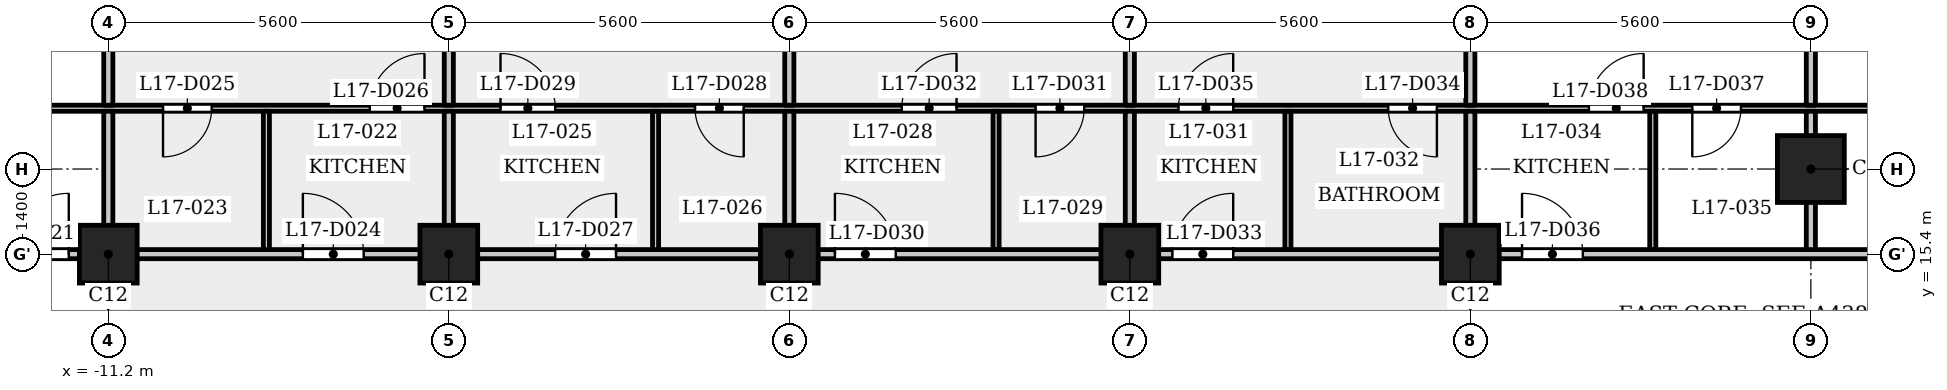
"""IFC4 building model, lengths in metres.
Left out: names, types, materials, properties, quantities, classifications, styles, units other than length and angle.
Written with IfcOpenShell. Run it as: python <this file> out.ifc"""

import sys

from ifc_helpers import new_model, si_unit, direction, frame, frame_2d, origin, origin_2d, place, context, subcontext, project, spatial, rectangle, extrude, element, fill, save


model = new_model("IFC4")
c1 = context("Model", 3, precision=1e-05, world=origin(), true_north=direction((0.0, 1.0)))
c2 = subcontext(c1, "Body", "Model", "MODEL_VIEW")
j1 = project(units=[si_unit("LENGTHUNIT", "METRE"), si_unit("PLANEANGLEUNIT", "RADIAN")], contexts=[c1])
p1 = place(None, origin())
s1 = spatial("IfcSite", under=j1, at=p1, CompositionType="ELEMENT")
p2 = place(p1, origin())
s2 = spatial("IfcBuilding", under=s1, at=p2, CompositionType="ELEMENT")
p3 = place(p2, frame((0.0, 0.0, 69.0)))
s3 = spatial("IfcBuildingStorey", under=s2, at=p3, CompositionType="ELEMENT", Elevation=69.0)
p4 = place(p3, frame((16.8, 16.8, 0.0), z_axis=(0.0, 0.0, 1.0), x_axis=(1.0, 0.0, 0.0)))
e1 = element("IfcColumn", 1, at=p4, inside=s3, PredefinedType="COLUMN", context=c2, shape_type="SweptSolid", body=[
    extrude(rectangle(XDim=1.1, YDim=1.1, at=origin_2d()), origin(), (0.0, 0.0, 1.0), 3.5),
])
for number, where, z_axis, x_axis in (
    (2, (-11.2, 15.4, 0.0), (0.0, 0.0, 1.0), (1.0, 0.0, 0.0)),
    (3, (-5.6, 15.4, 0.0), (0.0, 0.0, 1.0), (1.0, 0.0, 0.0)),
    (4, (0.0, 15.4, 0.0), (0.0, 0.0, 1.0), (1.0, 0.0, 0.0)),
    (5, (5.6, 15.4, 0.0), (0.0, 0.0, 1.0), (1.0, 0.0, 0.0)),
    (6, (11.2, 15.4, 0.0), (0.0, 0.0, 1.0), (1.0, 0.0, 0.0)),
):
    element("IfcColumn", number, at=place(p3, frame(where, z_axis=z_axis, x_axis=x_axis)), inside=s3, PredefinedType="COLUMN", context=c2, shape_type="SweptSolid", body=[
        extrude(rectangle(XDim=0.95, YDim=0.95, at=origin_2d()), origin(), (0.0, 0.0, 1.0), 3.5),
    ])
p5 = place(p3, frame((-27.484, 15.4, 0.0), z_axis=(0.0, 0.0, 1.0), x_axis=(1.0, 0.0, 0.0)))
e7 = element("IfcWall", 7, at=p5, inside=s3, PredefinedType="PARTITIONING", context=c2, shape_type="SweptSolid", body=[
    extrude(rectangle(XDim=54.968, YDim=0.15, at=frame_2d((27.484, 0.0))), origin(), (0.0, 0.0, 1.0), 3.15),
])
p6 = place(p5, frame((8.784, 0.0, 0.0)))
e8 = element("IfcOpeningElement", 8, at=p6, cuts=e7, PredefinedType="OPENING", context=c2, shape_type="SweptSolid", body=[
    extrude(rectangle(XDim=1.0, YDim=2.1, at=frame_2d((0.5, 1.05))), frame((0.0, 0.085, 0.0), z_axis=(0.0, -1.0, 0.0), x_axis=(1.0, 0.0, 0.0)), (0.0, 0.0, 1.0), 0.17),
])
p7 = place(p5, frame((14.634, 0.0, 0.0)))
e9 = element("IfcOpeningElement", 9, at=p7, cuts=e7, PredefinedType="OPENING", context=c2, shape_type="SweptSolid", body=[
    extrude(rectangle(XDim=1.0, YDim=2.1, at=frame_2d((0.5, 1.05))), frame((0.0, 0.085, 0.0), z_axis=(0.0, -1.0, 0.0), x_axis=(1.0, 0.0, 0.0)), (0.0, 0.0, 1.0), 0.17),
])
p8 = place(p5, frame((19.484, 0.0, 0.0)))
e10 = element("IfcOpeningElement", 10, at=p8, cuts=e7, PredefinedType="OPENING", context=c2, shape_type="SweptSolid", body=[
    extrude(rectangle(XDim=1.0, YDim=2.1, at=frame_2d((0.5, 1.05))), frame((0.0, 0.085, 0.0), z_axis=(0.0, -1.0, 0.0), x_axis=(1.0, 0.0, 0.0)), (0.0, 0.0, 1.0), 0.17),
])
p9 = place(p5, frame((23.634, 0.0, 0.0)))
e11 = element("IfcOpeningElement", 11, at=p9, cuts=e7, PredefinedType="OPENING", context=c2, shape_type="SweptSolid", body=[
    extrude(rectangle(XDim=1.0, YDim=2.1, at=frame_2d((0.5, 1.05))), frame((0.0, 0.085, 0.0), z_axis=(0.0, -1.0, 0.0), x_axis=(1.0, 0.0, 0.0)), (0.0, 0.0, 1.0), 0.17),
])
p10 = place(p5, frame((28.234, 0.0, 0.0)))
e12 = element("IfcOpeningElement", 12, at=p10, cuts=e7, PredefinedType="OPENING", context=c2, shape_type="SweptSolid", body=[
    extrude(rectangle(XDim=1.0, YDim=2.1, at=frame_2d((0.5, 1.05))), frame((0.0, 0.085, 0.0), z_axis=(0.0, -1.0, 0.0), x_axis=(1.0, 0.0, 0.0)), (0.0, 0.0, 1.0), 0.17),
])
p11 = place(p5, frame((33.784, 0.0, 0.0)))
e13 = element("IfcOpeningElement", 13, at=p11, cuts=e7, PredefinedType="OPENING", context=c2, shape_type="SweptSolid", body=[
    extrude(rectangle(XDim=1.0, YDim=2.1, at=frame_2d((0.5, 1.05))), frame((0.0, 0.085, 0.0), z_axis=(0.0, -1.0, 0.0), x_axis=(1.0, 0.0, 0.0)), (0.0, 0.0, 1.0), 0.17),
])
p12 = place(p5, frame((39.534, 0.0, 0.0)))
e14 = element("IfcOpeningElement", 14, at=p12, cuts=e7, PredefinedType="OPENING", context=c2, shape_type="SweptSolid", body=[
    extrude(rectangle(XDim=1.0, YDim=2.1, at=frame_2d((0.5, 1.05))), frame((0.0, 0.085, 0.0), z_axis=(0.0, -1.0, 0.0), x_axis=(1.0, 0.0, 0.0)), (0.0, 0.0, 1.0), 0.17),
])
p13 = place(p5, frame((48.234, 0.0, 0.0)))
e15 = element("IfcOpeningElement", 15, at=p13, cuts=e7, PredefinedType="OPENING", context=c2, shape_type="SweptSolid", body=[
    extrude(rectangle(XDim=1.0, YDim=2.1, at=frame_2d((0.5, 1.05))), frame((0.0, 0.085, 0.0), z_axis=(0.0, -1.0, 0.0), x_axis=(1.0, 0.0, 0.0)), (0.0, 0.0, 1.0), 0.17),
])
p14 = place(p3, frame((-26.64, 17.8, 0.0), z_axis=(0.0, 0.0, 1.0), x_axis=(1.0, 0.0, 0.0)))
e16 = element("IfcWall", 16, at=p14, inside=s3, PredefinedType="PARTITIONING", context=c2, shape_type="SweptSolid", body=[
    extrude(rectangle(XDim=53.034, YDim=0.1, at=frame_2d((26.517, 0.0))), origin(), (0.0, 0.0, 1.0), 3.15),
])
p15 = place(p14, frame((2.872, 0.0, 0.0)))
e17 = element("IfcOpeningElement", 17, at=p15, cuts=e16, PredefinedType="OPENING", context=c2, shape_type="SweptSolid", body=[
    extrude(rectangle(XDim=0.8, YDim=2.1, at=frame_2d((0.4, 1.05))), frame((0.0, 0.06, 0.0), z_axis=(0.0, -1.0, 0.0), x_axis=(1.0, 0.0, 0.0)), (0.0, 0.0, 1.0), 0.12),
])
p16 = place(p14, frame((7.04, 0.0, 0.0)))
e18 = element("IfcOpeningElement", 18, at=p16, cuts=e16, PredefinedType="OPENING", context=c2, shape_type="SweptSolid", body=[
    extrude(rectangle(XDim=0.9, YDim=2.1, at=frame_2d((0.45, 1.05))), frame((0.0, 0.06, 0.0), z_axis=(0.0, -1.0, 0.0), x_axis=(1.0, 0.0, 0.0)), (0.0, 0.0, 1.0), 0.12),
])
p17 = place(p14, frame((10.74, 0.0, 0.0)))
e19 = element("IfcOpeningElement", 19, at=p17, cuts=e16, PredefinedType="OPENING", context=c2, shape_type="SweptSolid", body=[
    extrude(rectangle(XDim=0.8, YDim=2.1, at=frame_2d((0.4, 1.05))), frame((0.0, 0.06, 0.0), z_axis=(0.0, -1.0, 0.0), x_axis=(1.0, 0.0, 0.0)), (0.0, 0.0, 1.0), 0.12),
])
p18 = place(p14, frame((12.89, 0.0, 0.0)))
e20 = element("IfcOpeningElement", 20, at=p18, cuts=e16, PredefinedType="OPENING", context=c2, shape_type="SweptSolid", body=[
    extrude(rectangle(XDim=0.9, YDim=2.1, at=frame_2d((0.45, 1.05))), frame((0.0, 0.06, 0.0), z_axis=(0.0, -1.0, 0.0), x_axis=(1.0, 0.0, 0.0)), (0.0, 0.0, 1.0), 0.12),
])
p19 = place(p14, frame((16.34, 0.0, 0.0)))
e21 = element("IfcOpeningElement", 21, at=p19, cuts=e16, PredefinedType="OPENING", context=c2, shape_type="SweptSolid", body=[
    extrude(rectangle(XDim=0.8, YDim=2.1, at=frame_2d((0.4, 1.05))), frame((0.0, 0.06, 0.0), z_axis=(0.0, -1.0, 0.0), x_axis=(1.0, 0.0, 0.0)), (0.0, 0.0, 1.0), 0.12),
])
p20 = place(p14, frame((19.74, 0.0, 0.0)))
e22 = element("IfcOpeningElement", 22, at=p20, cuts=e16, PredefinedType="OPENING", context=c2, shape_type="SweptSolid", body=[
    extrude(rectangle(XDim=0.9, YDim=2.1, at=frame_2d((0.45, 1.05))), frame((0.0, 0.06, 0.0), z_axis=(0.0, -1.0, 0.0), x_axis=(1.0, 0.0, 0.0)), (0.0, 0.0, 1.0), 0.12),
])
p21 = place(p14, frame((25.09, 0.0, 0.0)))
e23 = element("IfcOpeningElement", 23, at=p21, cuts=e16, PredefinedType="OPENING", context=c2, shape_type="SweptSolid", body=[
    extrude(rectangle(XDim=0.8, YDim=2.1, at=frame_2d((0.4, 1.05))), frame((0.0, 0.06, 0.0), z_axis=(0.0, -1.0, 0.0), x_axis=(1.0, 0.0, 0.0)), (0.0, 0.0, 1.0), 0.12),
])
p22 = place(p14, frame((21.89, 0.0, 0.0)))
e24 = element("IfcOpeningElement", 24, at=p22, cuts=e16, PredefinedType="OPENING", context=c2, shape_type="SweptSolid", body=[
    extrude(rectangle(XDim=0.9, YDim=2.1, at=frame_2d((0.45, 1.05))), frame((0.0, 0.06, 0.0), z_axis=(0.0, -1.0, 0.0), x_axis=(1.0, 0.0, 0.0)), (0.0, 0.0, 1.0), 0.12),
])
p23 = place(p14, frame((30.69, 0.0, 0.0)))
e25 = element("IfcOpeningElement", 25, at=p23, cuts=e16, PredefinedType="OPENING", context=c2, shape_type="SweptSolid", body=[
    extrude(rectangle(XDim=0.8, YDim=2.1, at=frame_2d((0.4, 1.05))), frame((0.0, 0.06, 0.0), z_axis=(0.0, -1.0, 0.0), x_axis=(1.0, 0.0, 0.0)), (0.0, 0.0, 1.0), 0.12),
])
p24 = place(p14, frame((28.49, 0.0, 0.0)))
e26 = element("IfcOpeningElement", 26, at=p24, cuts=e16, PredefinedType="OPENING", context=c2, shape_type="SweptSolid", body=[
    extrude(rectangle(XDim=0.9, YDim=2.1, at=frame_2d((0.45, 1.05))), frame((0.0, 0.06, 0.0), z_axis=(0.0, -1.0, 0.0), x_axis=(1.0, 0.0, 0.0)), (0.0, 0.0, 1.0), 0.12),
])
p25 = place(p14, frame((36.49, 0.0, 0.0)))
e27 = element("IfcOpeningElement", 27, at=p25, cuts=e16, PredefinedType="OPENING", context=c2, shape_type="SweptSolid", body=[
    extrude(rectangle(XDim=0.8, YDim=2.1, at=frame_2d((0.4, 1.05))), frame((0.0, 0.06, 0.0), z_axis=(0.0, -1.0, 0.0), x_axis=(1.0, 0.0, 0.0)), (0.0, 0.0, 1.0), 0.12),
])
p26 = place(p14, frame((33.04, 0.0, 0.0)))
e28 = element("IfcOpeningElement", 28, at=p26, cuts=e16, PredefinedType="OPENING", context=c2, shape_type="SweptSolid", body=[
    extrude(rectangle(XDim=0.9, YDim=2.1, at=frame_2d((0.45, 1.05))), frame((0.0, 0.06, 0.0), z_axis=(0.0, -1.0, 0.0), x_axis=(1.0, 0.0, 0.0)), (0.0, 0.0, 1.0), 0.12),
])
p27 = place(p14, frame((41.49, 0.0, 0.0)))
e29 = element("IfcOpeningElement", 29, at=p27, cuts=e16, PredefinedType="OPENING", context=c2, shape_type="SweptSolid", body=[
    extrude(rectangle(XDim=0.8, YDim=2.1, at=frame_2d((0.4, 1.05))), frame((0.0, 0.06, 0.0), z_axis=(0.0, -1.0, 0.0), x_axis=(1.0, 0.0, 0.0)), (0.0, 0.0, 1.0), 0.12),
])
p28 = place(p14, frame((39.79, 0.0, 0.0)))
e30 = element("IfcOpeningElement", 30, at=p28, cuts=e16, PredefinedType="OPENING", context=c2, shape_type="SweptSolid", body=[
    extrude(rectangle(XDim=0.9, YDim=2.1, at=frame_2d((0.45, 1.05))), frame((0.0, 0.06, 0.0), z_axis=(0.0, -1.0, 0.0), x_axis=(1.0, 0.0, 0.0)), (0.0, 0.0, 1.0), 0.12),
])
p29 = place(p14, frame((51.44, 0.0, 0.0)))
e31 = element("IfcOpeningElement", 31, at=p29, cuts=e16, PredefinedType="OPENING", context=c2, shape_type="SweptSolid", body=[
    extrude(rectangle(XDim=0.8, YDim=2.1, at=frame_2d((0.4, 1.05))), frame((0.0, 0.06, 0.0), z_axis=(0.0, -1.0, 0.0), x_axis=(1.0, 0.0, 0.0)), (0.0, 0.0, 1.0), 0.12),
])
p30 = place(p14, frame((46.49, 0.0, 0.0)))
e32 = element("IfcOpeningElement", 32, at=p30, cuts=e16, PredefinedType="OPENING", context=c2, shape_type="SweptSolid", body=[
    extrude(rectangle(XDim=0.9, YDim=2.1, at=frame_2d((0.45, 1.05))), frame((0.0, 0.06, 0.0), z_axis=(0.0, -1.0, 0.0), x_axis=(1.0, 0.0, 0.0)), (0.0, 0.0, 1.0), 0.12),
])
p31 = place(p3, frame((-11.2, 15.475, 0.0), z_axis=(0.0, 0.0, 1.0), x_axis=(0.0, 1.0, 0.0)))
e33 = element("IfcWall", 33, at=p31, inside=s3, PredefinedType="PARTITIONING", context=c2, shape_type="SweptSolid", body=[
    extrude(rectangle(XDim=2.275, YDim=0.15, at=frame_2d((1.137, 0.0))), origin(), (0.0, 0.0, 1.0), 3.15),
])
p32 = place(p3, frame((-11.2, 17.85, 0.0), z_axis=(0.0, 0.0, 1.0), x_axis=(0.0, 1.0, 0.0)))
e34 = element("IfcWall", 34, at=p32, inside=s3, PredefinedType="PARTITIONING", context=c2, shape_type="SweptSolid", body=[
    extrude(rectangle(XDim=5.23, YDim=0.15, at=frame_2d((2.615, 0.0))), origin(), (0.0, 0.0, 1.0), 3.15),
])
p33 = place(p3, frame((-8.6, 15.475, 0.0), z_axis=(0.0, 0.0, 1.0), x_axis=(0.0, 1.0, 0.0)))
e35 = element("IfcWall", 35, at=p33, inside=s3, PredefinedType="PARTITIONING", context=c2, shape_type="SweptSolid", body=[
    extrude(rectangle(XDim=2.275, YDim=0.1, at=frame_2d((1.137, 0.0))), origin(), (0.0, 0.0, 1.0), 3.15),
])
p34 = place(p3, frame((-5.6, 15.475, 0.0), z_axis=(0.0, 0.0, 1.0), x_axis=(0.0, 1.0, 0.0)))
e36 = element("IfcWall", 36, at=p34, inside=s3, PredefinedType="PARTITIONING", context=c2, shape_type="SweptSolid", body=[
    extrude(rectangle(XDim=2.275, YDim=0.15, at=frame_2d((1.137, 0.0))), origin(), (0.0, 0.0, 1.0), 3.15),
])
p35 = place(p3, frame((-5.6, 17.85, 0.0), z_axis=(0.0, 0.0, 1.0), x_axis=(0.0, 1.0, 0.0)))
e37 = element("IfcWall", 37, at=p35, inside=s3, PredefinedType="PARTITIONING", context=c2, shape_type="SweptSolid", body=[
    extrude(rectangle(XDim=5.23, YDim=0.15, at=frame_2d((2.615, 0.0))), origin(), (0.0, 0.0, 1.0), 3.15),
])
p36 = place(p3, frame((-2.2, 15.475, 0.0), z_axis=(0.0, 0.0, 1.0), x_axis=(0.0, 1.0, 0.0)))
e38 = element("IfcWall", 38, at=p36, inside=s3, PredefinedType="PARTITIONING", context=c2, shape_type="SweptSolid", body=[
    extrude(rectangle(XDim=2.275, YDim=0.1, at=frame_2d((1.137, 0.0))), origin(), (0.0, 0.0, 1.0), 3.15),
])
p37 = place(p3, frame((0.0, 15.475, 0.0), z_axis=(0.0, 0.0, 1.0), x_axis=(0.0, 1.0, 0.0)))
e39 = element("IfcWall", 39, at=p37, inside=s3, PredefinedType="PARTITIONING", context=c2, shape_type="SweptSolid", body=[
    extrude(rectangle(XDim=2.275, YDim=0.15, at=frame_2d((1.137, 0.0))), origin(), (0.0, 0.0, 1.0), 3.15),
])
p38 = place(p3, frame((0.0, 17.85, 0.0), z_axis=(0.0, 0.0, 1.0), x_axis=(0.0, 1.0, 0.0)))
e40 = element("IfcWall", 40, at=p38, inside=s3, PredefinedType="PARTITIONING", context=c2, shape_type="SweptSolid", body=[
    extrude(rectangle(XDim=5.23, YDim=0.15, at=frame_2d((2.615, 0.0))), origin(), (0.0, 0.0, 1.0), 3.15),
])
p39 = place(p3, frame((3.4, 15.475, 0.0), z_axis=(0.0, 0.0, 1.0), x_axis=(0.0, 1.0, 0.0)))
e41 = element("IfcWall", 41, at=p39, inside=s3, PredefinedType="PARTITIONING", context=c2, shape_type="SweptSolid", body=[
    extrude(rectangle(XDim=2.275, YDim=0.1, at=frame_2d((1.137, 0.0))), origin(), (0.0, 0.0, 1.0), 3.15),
])
p40 = place(p3, frame((5.6, 15.475, 0.0), z_axis=(0.0, 0.0, 1.0), x_axis=(0.0, 1.0, 0.0)))
e42 = element("IfcWall", 42, at=p40, inside=s3, PredefinedType="PARTITIONING", context=c2, shape_type="SweptSolid", body=[
    extrude(rectangle(XDim=2.275, YDim=0.15, at=frame_2d((1.137, 0.0))), origin(), (0.0, 0.0, 1.0), 3.15),
])
p41 = place(p3, frame((5.6, 17.85, 0.0), z_axis=(0.0, 0.0, 1.0), x_axis=(0.0, 1.0, 0.0)))
e43 = element("IfcWall", 43, at=p41, inside=s3, PredefinedType="PARTITIONING", context=c2, shape_type="SweptSolid", body=[
    extrude(rectangle(XDim=5.23, YDim=0.15, at=frame_2d((2.615, 0.0))), origin(), (0.0, 0.0, 1.0), 3.15),
])
p42 = place(p3, frame((8.2, 15.475, 0.0), z_axis=(0.0, 0.0, 1.0), x_axis=(0.0, 1.0, 0.0)))
e44 = element("IfcWall", 44, at=p42, inside=s3, PredefinedType="PARTITIONING", context=c2, shape_type="SweptSolid", body=[
    extrude(rectangle(XDim=2.275, YDim=0.1, at=frame_2d((1.137, 0.0))), origin(), (0.0, 0.0, 1.0), 3.15),
])
p43 = place(p3, frame((11.2, 15.475, 0.0), z_axis=(0.0, 0.0, 1.0), x_axis=(0.0, 1.0, 0.0)))
e45 = element("IfcWall", 45, at=p43, inside=s3, PredefinedType="PARTITIONING", context=c2, shape_type="SweptSolid", body=[
    extrude(rectangle(XDim=2.275, YDim=0.15, at=frame_2d((1.137, 0.0))), origin(), (0.0, 0.0, 1.0), 3.15),
])
p44 = place(p3, frame((11.2, 17.85, 0.0), z_axis=(0.0, 0.0, 1.0), x_axis=(0.0, 1.0, 0.0)))
e46 = element("IfcWall", 46, at=p44, inside=s3, PredefinedType="PARTITIONING", context=c2, shape_type="SweptSolid", body=[
    extrude(rectangle(XDim=5.23, YDim=0.15, at=frame_2d((2.615, 0.0))), origin(), (0.0, 0.0, 1.0), 3.15),
])
p45 = place(p3, frame((14.2, 15.475, 0.0), z_axis=(0.0, 0.0, 1.0), x_axis=(0.0, 1.0, 0.0)))
e47 = element("IfcWall", 47, at=p45, inside=s3, PredefinedType="PARTITIONING", context=c2, shape_type="SweptSolid", body=[
    extrude(rectangle(XDim=2.275, YDim=0.1, at=frame_2d((1.137, 0.0))), origin(), (0.0, 0.0, 1.0), 3.15),
])
p46 = place(p3, frame((16.8, 15.475, 0.0), z_axis=(0.0, 0.0, 1.0), x_axis=(0.0, 1.0, 0.0)))
e48 = element("IfcWall", 48, at=p46, inside=s3, PredefinedType="PARTITIONING", context=c2, shape_type="SweptSolid", body=[
    extrude(rectangle(XDim=2.275, YDim=0.15, at=frame_2d((1.137, 0.0))), origin(), (0.0, 0.0, 1.0), 3.15),
])
p47 = place(p3, frame((16.8, 17.85, 0.0), z_axis=(0.0, 0.0, 1.0), x_axis=(0.0, 1.0, 0.0)))
e49 = element("IfcWall", 49, at=p47, inside=s3, PredefinedType="PARTITIONING", context=c2, shape_type="SweptSolid", body=[
    extrude(rectangle(XDim=5.23, YDim=0.15, at=frame_2d((2.615, 0.0))), origin(), (0.0, 0.0, 1.0), 3.15),
])
p48 = place(p7, origin())
e50 = element("IfcDoor", 50, at=p48, inside=s3, OperationType="SINGLE_SWING_LEFT", PredefinedType="DOOR", context=c2, shape_type="SweptSolid", body=[
    extrude(rectangle(XDim=1.0, YDim=2.1, at=frame_2d((0.5, 1.05))), frame((0.0, 0.025, 0.0), z_axis=(0.0, -1.0, 0.0), x_axis=(1.0, 0.0, 0.0)), (0.0, 0.0, 1.0), 0.05),
])
fill(e9, e50)
p49 = place(p8, origin())
e51 = element("IfcDoor", 51, at=p49, inside=s3, OperationType="SINGLE_SWING_RIGHT", PredefinedType="DOOR", context=c2, shape_type="SweptSolid", body=[
    extrude(rectangle(XDim=1.0, YDim=2.1, at=frame_2d((0.5, 1.05))), frame((0.0, 0.025, 0.0), z_axis=(0.0, -1.0, 0.0), x_axis=(1.0, 0.0, 0.0)), (0.0, 0.0, 1.0), 0.05),
])
fill(e10, e51)
p50 = place(p19, origin())
e52 = element("IfcDoor", 52, at=p50, inside=s3, OperationType="SINGLE_SWING_LEFT", PredefinedType="DOOR", context=c2, shape_type="SweptSolid", body=[
    extrude(rectangle(XDim=0.8, YDim=2.1, at=frame_2d((0.4, 1.05))), frame((0.0, 0.025, 0.0), z_axis=(0.0, -1.0, 0.0), x_axis=(1.0, 0.0, 0.0)), (0.0, 0.0, 1.0), 0.05),
])
fill(e21, e52)
p51 = place(p20, origin())
e53 = element("IfcDoor", 53, at=p51, inside=s3, OperationType="SINGLE_SWING_LEFT", PredefinedType="DOOR", context=c2, shape_type="SweptSolid", body=[
    extrude(rectangle(XDim=0.9, YDim=2.1, at=frame_2d((0.45, 1.05))), frame((0.0, 0.025, 0.0), z_axis=(0.0, -1.0, 0.0), x_axis=(1.0, 0.0, 0.0)), (0.0, 0.0, 1.0), 0.05),
])
fill(e22, e53)
p52 = place(p9, origin())
e54 = element("IfcDoor", 54, at=p52, inside=s3, OperationType="SINGLE_SWING_LEFT", PredefinedType="DOOR", context=c2, shape_type="SweptSolid", body=[
    extrude(rectangle(XDim=1.0, YDim=2.1, at=frame_2d((0.5, 1.05))), frame((0.0, 0.025, 0.0), z_axis=(0.0, -1.0, 0.0), x_axis=(1.0, 0.0, 0.0)), (0.0, 0.0, 1.0), 0.05),
])
fill(e11, e54)
p53 = place(p21, origin())
e55 = element("IfcDoor", 55, at=p53, inside=s3, OperationType="SINGLE_SWING_RIGHT", PredefinedType="DOOR", context=c2, shape_type="SweptSolid", body=[
    extrude(rectangle(XDim=0.8, YDim=2.1, at=frame_2d((0.4, 1.05))), frame((0.0, 0.025, 0.0), z_axis=(0.0, -1.0, 0.0), x_axis=(1.0, 0.0, 0.0)), (0.0, 0.0, 1.0), 0.05),
])
fill(e23, e55)
p54 = place(p22, origin())
e56 = element("IfcDoor", 56, at=p54, inside=s3, OperationType="SINGLE_SWING_RIGHT", PredefinedType="DOOR", context=c2, shape_type="SweptSolid", body=[
    extrude(rectangle(XDim=0.9, YDim=2.1, at=frame_2d((0.45, 1.05))), frame((0.0, 0.025, 0.0), z_axis=(0.0, -1.0, 0.0), x_axis=(1.0, 0.0, 0.0)), (0.0, 0.0, 1.0), 0.05),
])
fill(e24, e56)
p55 = place(p10, origin())
e57 = element("IfcDoor", 57, at=p55, inside=s3, OperationType="SINGLE_SWING_RIGHT", PredefinedType="DOOR", context=c2, shape_type="SweptSolid", body=[
    extrude(rectangle(XDim=1.0, YDim=2.1, at=frame_2d((0.5, 1.05))), frame((0.0, 0.025, 0.0), z_axis=(0.0, -1.0, 0.0), x_axis=(1.0, 0.0, 0.0)), (0.0, 0.0, 1.0), 0.05),
])
fill(e12, e57)
p56 = place(p23, origin())
e58 = element("IfcDoor", 58, at=p56, inside=s3, OperationType="SINGLE_SWING_LEFT", PredefinedType="DOOR", context=c2, shape_type="SweptSolid", body=[
    extrude(rectangle(XDim=0.8, YDim=2.1, at=frame_2d((0.4, 1.05))), frame((0.0, 0.025, 0.0), z_axis=(0.0, -1.0, 0.0), x_axis=(1.0, 0.0, 0.0)), (0.0, 0.0, 1.0), 0.05),
])
fill(e25, e58)
p57 = place(p24, origin())
e59 = element("IfcDoor", 59, at=p57, inside=s3, OperationType="SINGLE_SWING_LEFT", PredefinedType="DOOR", context=c2, shape_type="SweptSolid", body=[
    extrude(rectangle(XDim=0.9, YDim=2.1, at=frame_2d((0.45, 1.05))), frame((0.0, 0.025, 0.0), z_axis=(0.0, -1.0, 0.0), x_axis=(1.0, 0.0, 0.0)), (0.0, 0.0, 1.0), 0.05),
])
fill(e26, e59)
p58 = place(p11, origin())
e60 = element("IfcDoor", 60, at=p58, inside=s3, OperationType="SINGLE_SWING_LEFT", PredefinedType="DOOR", context=c2, shape_type="SweptSolid", body=[
    extrude(rectangle(XDim=1.0, YDim=2.1, at=frame_2d((0.5, 1.05))), frame((0.0, 0.025, 0.0), z_axis=(0.0, -1.0, 0.0), x_axis=(1.0, 0.0, 0.0)), (0.0, 0.0, 1.0), 0.05),
])
fill(e13, e60)
p59 = place(p25, origin())
e61 = element("IfcDoor", 61, at=p59, inside=s3, OperationType="SINGLE_SWING_RIGHT", PredefinedType="DOOR", context=c2, shape_type="SweptSolid", body=[
    extrude(rectangle(XDim=0.8, YDim=2.1, at=frame_2d((0.4, 1.05))), frame((0.0, 0.025, 0.0), z_axis=(0.0, -1.0, 0.0), x_axis=(1.0, 0.0, 0.0)), (0.0, 0.0, 1.0), 0.05),
])
fill(e27, e61)
p60 = place(p26, origin())
e62 = element("IfcDoor", 62, at=p60, inside=s3, OperationType="SINGLE_SWING_LEFT", PredefinedType="DOOR", context=c2, shape_type="SweptSolid", body=[
    extrude(rectangle(XDim=0.9, YDim=2.1, at=frame_2d((0.45, 1.05))), frame((0.0, 0.025, 0.0), z_axis=(0.0, -1.0, 0.0), x_axis=(1.0, 0.0, 0.0)), (0.0, 0.0, 1.0), 0.05),
])
fill(e28, e62)
p61 = place(p12, origin())
e63 = element("IfcDoor", 63, at=p61, inside=s3, OperationType="SINGLE_SWING_RIGHT", PredefinedType="DOOR", context=c2, shape_type="SweptSolid", body=[
    extrude(rectangle(XDim=1.0, YDim=2.1, at=frame_2d((0.5, 1.05))), frame((0.0, 0.025, 0.0), z_axis=(0.0, -1.0, 0.0), x_axis=(1.0, 0.0, 0.0)), (0.0, 0.0, 1.0), 0.05),
])
fill(e14, e63)
p62 = place(p27, origin())
e64 = element("IfcDoor", 64, at=p62, inside=s3, OperationType="SINGLE_SWING_LEFT", PredefinedType="DOOR", context=c2, shape_type="SweptSolid", body=[
    extrude(rectangle(XDim=0.8, YDim=2.1, at=frame_2d((0.4, 1.05))), frame((0.0, 0.025, 0.0), z_axis=(0.0, -1.0, 0.0), x_axis=(1.0, 0.0, 0.0)), (0.0, 0.0, 1.0), 0.05),
])
fill(e29, e64)
p63 = place(p28, origin())
e65 = element("IfcDoor", 65, at=p63, inside=s3, OperationType="SINGLE_SWING_LEFT", PredefinedType="DOOR", context=c2, shape_type="SweptSolid", body=[
    extrude(rectangle(XDim=0.9, YDim=2.1, at=frame_2d((0.45, 1.05))), frame((0.0, 0.025, 0.0), z_axis=(0.0, -1.0, 0.0), x_axis=(1.0, 0.0, 0.0)), (0.0, 0.0, 1.0), 0.05),
])
fill(e30, e65)
save(model, sys.argv[1])
